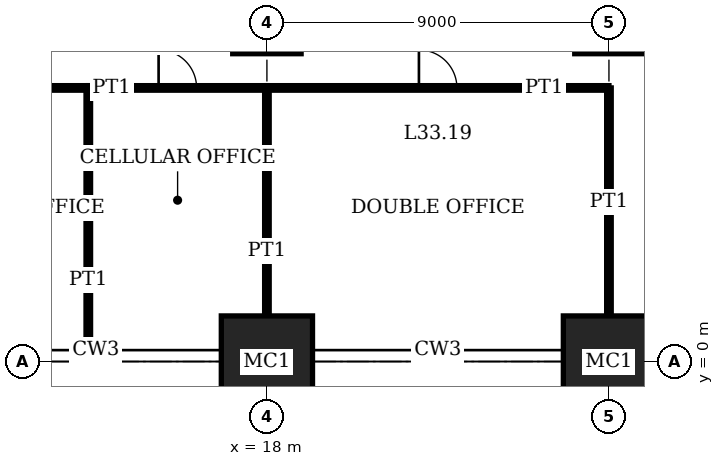
"""IFC4 building model, lengths in metres.
Left out: names, types, materials, properties, quantities, classifications, styles, units other than length and angle.
Written with IfcOpenShell. Run it as: python <this file> out.ifc"""

import sys

from ifc_helpers import new_model, si_unit, direction, frame, frame_2d, origin, origin_2d, place, context, subcontext, project, spatial, rectangle, extrude, element, fill, save


model = new_model("IFC4")
c1 = context("Model", 3, precision=1e-05, world=origin(), true_north=direction((0.0, 1.0)))
c2 = subcontext(c1, "Body", "Model", "MODEL_VIEW")
j1 = project(units=[si_unit("LENGTHUNIT", "METRE"), si_unit("PLANEANGLEUNIT", "RADIAN")], contexts=[c1])
p1 = place(None, origin())
s1 = spatial("IfcSite", under=j1, at=p1, CompositionType="ELEMENT")
p2 = place(p1, origin())
s2 = spatial("IfcBuilding", under=s1, at=p2, CompositionType="ELEMENT")
p3 = place(p2, frame((0.0, 0.0, 137.0)))
s3 = spatial("IfcBuildingStorey", under=s2, at=p3, CompositionType="ELEMENT", Elevation=137.0)
p4 = place(p3, frame((18.0, 0.0, 0.0), z_axis=(0.0, 0.0, 1.0), x_axis=(1.0, 0.0, 0.0)))
e1 = element("IfcColumn", 1, at=p4, inside=s3, PredefinedType="COLUMN", context=c2, shape_type="SweptSolid", body=[
    extrude(rectangle(XDim=2.4, YDim=2.4, at=origin_2d()), origin(), (0.0, 0.0, 1.0), 4.0),
])
p5 = place(p3, frame((18.0, 9.0, 0.0), z_axis=(0.0, 0.0, 1.0), x_axis=(1.0, 0.0, 0.0)))
e2 = element("IfcColumn", 2, at=p5, inside=s3, PredefinedType="COLUMN", context=c2, shape_type="SweptSolid", body=[
    extrude(rectangle(XDim=1.8, YDim=1.8, at=origin_2d()), origin(), (0.0, 0.0, 1.0), 4.0),
])
p6 = place(p3, frame((27.0, 0.0, 0.0), z_axis=(0.0, 0.0, 1.0), x_axis=(1.0, 0.0, 0.0)))
e3 = element("IfcColumn", 3, at=p6, inside=s3, PredefinedType="COLUMN", context=c2, shape_type="SweptSolid", body=[
    extrude(rectangle(XDim=2.4, YDim=2.4, at=origin_2d()), origin(), (0.0, 0.0, 1.0), 4.0),
])
p7 = place(p3, frame((27.0, 9.0, 0.0), z_axis=(0.0, 0.0, 1.0), x_axis=(1.0, 0.0, 0.0)))
e4 = element("IfcColumn", 4, at=p7, inside=s3, PredefinedType="COLUMN", context=c2, shape_type="SweptSolid", body=[
    extrude(rectangle(XDim=1.8, YDim=1.8, at=origin_2d()), origin(), (0.0, 0.0, 1.0), 4.0),
])
p8 = place(p3, frame((9.0, 7.2, 0.0), z_axis=(0.0, 0.0, 1.0), x_axis=(1.0, 0.0, 0.0)))
e5 = element("IfcWall", 5, at=p8, inside=s3, PredefinedType="PARTITIONING", context=c2, shape_type="SweptSolid", body=[
    extrude(rectangle(XDim=4.3, YDim=0.12, at=frame_2d((2.15, 0.0))), origin(), (0.0, 0.0, 1.0), 3.75),
])
p9 = place(p8, frame((1.65, 0.0, 0.0)))
e6 = element("IfcOpeningElement", 6, at=p9, cuts=e5, PredefinedType="OPENING", context=c2, shape_type="SweptSolid", body=[
    extrude(rectangle(XDim=1.0, YDim=2.4, at=frame_2d((0.5, 1.2))), frame((0.0, 0.07, 0.0), z_axis=(0.0, -1.0, 0.0), x_axis=(1.0, 0.0, 0.0)), (0.0, 0.0, 1.0), 0.14),
])
p10 = place(p3, frame((13.3, 7.2, 0.0), z_axis=(0.0, 0.0, 1.0), x_axis=(1.0, 0.0, 0.0)))
e7 = element("IfcWall", 7, at=p10, inside=s3, PredefinedType="PARTITIONING", context=c2, shape_type="SweptSolid", body=[
    extrude(rectangle(XDim=4.7, YDim=0.12, at=frame_2d((2.35, 0.0))), origin(), (0.0, 0.0, 1.0), 3.75),
])
p11 = place(p10, frame((1.85, 0.0, 0.0)))
e8 = element("IfcOpeningElement", 8, at=p11, cuts=e7, PredefinedType="OPENING", context=c2, shape_type="SweptSolid", body=[
    extrude(rectangle(XDim=1.0, YDim=2.4, at=frame_2d((0.5, 1.2))), frame((0.0, 0.07, 0.0), z_axis=(0.0, -1.0, 0.0), x_axis=(1.0, 0.0, 0.0)), (0.0, 0.0, 1.0), 0.14),
])
p12 = place(p3, frame((18.0, 7.2, 0.0), z_axis=(0.0, 0.0, 1.0), x_axis=(1.0, 0.0, 0.0)))
e9 = element("IfcWall", 9, at=p12, inside=s3, PredefinedType="PARTITIONING", context=c2, shape_type="SweptSolid", body=[
    extrude(rectangle(XDim=9.0, YDim=0.12, at=frame_2d((4.5, 0.0))), origin(), (0.0, 0.0, 1.0), 3.75),
])
p13 = place(p12, frame((4.0, 0.0, 0.0)))
e10 = element("IfcOpeningElement", 10, at=p13, cuts=e9, PredefinedType="OPENING", context=c2, shape_type="SweptSolid", body=[
    extrude(rectangle(XDim=1.0, YDim=2.4, at=frame_2d((0.5, 1.2))), frame((0.0, 0.07, 0.0), z_axis=(0.0, -1.0, 0.0), x_axis=(1.0, 0.0, 0.0)), (0.0, 0.0, 1.0), 0.14),
])
p14 = place(p3, frame((13.3, 0.31, 0.0), z_axis=(0.0, 0.0, 1.0), x_axis=(0.0, 1.0, 0.0)))
e11 = element("IfcWall", 11, at=p14, inside=s3, PredefinedType="PARTITIONING", context=c2, shape_type="SweptSolid", body=[
    extrude(rectangle(XDim=6.89, YDim=0.12, at=frame_2d((3.445, 0.0))), origin(), (0.0, 0.0, 1.0), 3.75),
])
for number, where, z_axis, x_axis in (
    (12, (18.0, 1.2, 0.0), (0.0, 0.0, 1.0), (0.0, 1.0, 0.0)),
    (13, (27.0, 1.2, 0.0), (0.0, 0.0, 1.0), (0.0, 1.0, 0.0)),
):
    element("IfcWall", number, at=place(p3, frame(where, z_axis=z_axis, x_axis=x_axis)), inside=s3, PredefinedType="PARTITIONING", context=c2, shape_type="SweptSolid", body=[
        extrude(rectangle(XDim=6.0, YDim=0.12, at=frame_2d((3.0, 0.0))), origin(), (0.0, 0.0, 1.0), 3.05),
    ])
p15 = place(p11, origin())
e14 = element("IfcDoor", 14, at=p15, inside=s3, OperationType="SINGLE_SWING_RIGHT", PredefinedType="DOOR", context=c2, shape_type="SweptSolid", body=[
    extrude(rectangle(XDim=1.0, YDim=2.4, at=frame_2d((0.5, 1.2))), frame((0.0, 0.025, 0.0), z_axis=(0.0, -1.0, 0.0), x_axis=(1.0, 0.0, 0.0)), (0.0, 0.0, 1.0), 0.05),
])
fill(e8, e14)
p16 = place(p13, origin())
e15 = element("IfcDoor", 15, at=p16, inside=s3, OperationType="SINGLE_SWING_RIGHT", PredefinedType="DOOR", context=c2, shape_type="SweptSolid", body=[
    extrude(rectangle(XDim=1.0, YDim=2.4, at=frame_2d((0.5, 1.2))), frame((0.0, 0.025, 0.0), z_axis=(0.0, -1.0, 0.0), x_axis=(1.0, 0.0, 0.0)), (0.0, 0.0, 1.0), 0.05),
])
fill(e10, e15)
save(model, sys.argv[1])
